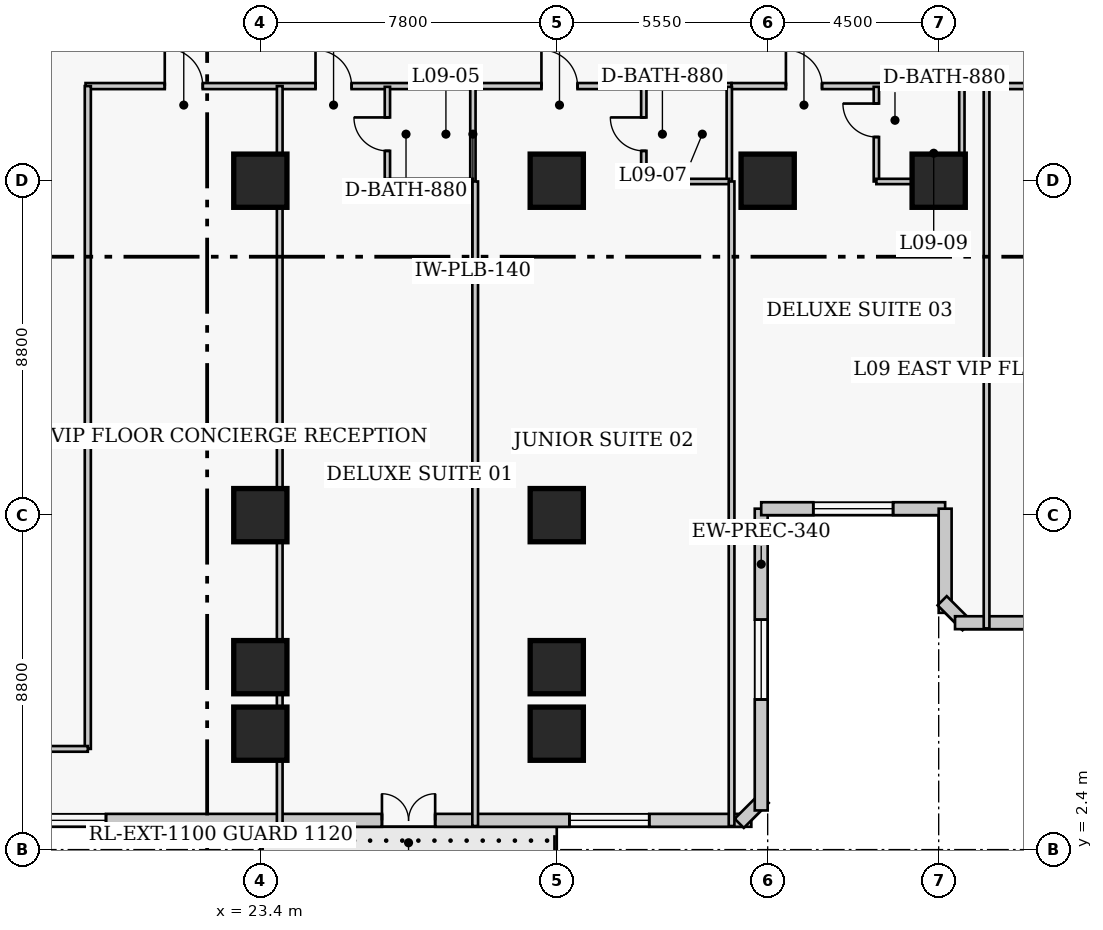
"""IFC4 building model, lengths in metres.
Left out: names, types, materials, properties, quantities, classifications, styles, units other than length and angle.
Written with IfcOpenShell. Run it as: python <this file> out.ifc"""

import sys

from ifc_helpers import new_model, si_unit, direction, frame, frame_2d, origin, origin_2d, place, context, subcontext, project, spatial, rectangle, extrude, element, fill, save


model = new_model("IFC4")
c1 = context("Model", 3, precision=1e-05, world=origin(), true_north=direction((0.0, 1.0)))
c2 = subcontext(c1, "Body", "Model", "MODEL_VIEW")
j1 = project(units=[si_unit("LENGTHUNIT", "METRE"), si_unit("PLANEANGLEUNIT", "RADIAN")], contexts=[c1])
p1 = place(None, origin())
s1 = spatial("IfcSite", under=j1, at=p1, CompositionType="ELEMENT")
p2 = place(p1, origin())
s2 = spatial("IfcBuilding", under=s1, at=p2, CompositionType="ELEMENT")
p3 = place(p2, frame((0.0, 0.0, 41.2)))
s3 = spatial("IfcBuildingStorey", under=s2, at=p3, CompositionType="ELEMENT", Elevation=41.2)
for number, where, z_axis, x_axis in (
    (1, (23.4, 11.2, 0.0), (0.0, 0.0, 1.0), (1.0, 0.0, 0.0)),
    (2, (23.4, 20.0, 0.0), (0.0, 0.0, 1.0), (1.0, 0.0, 0.0)),
    (3, (31.2, 11.2, 0.0), (0.0, 0.0, 1.0), (1.0, 0.0, 0.0)),
    (4, (31.2, 20.0, 0.0), (0.0, 0.0, 1.0), (1.0, 0.0, 0.0)),
    (5, (36.75, 20.0, 0.0), (0.0, 0.0, 1.0), (1.0, 0.0, 0.0)),
    (6, (41.25, 20.0, 0.0), (0.0, 0.0, 1.0), (1.0, 0.0, 0.0)),
    (7, (23.4, 7.2, 0.0), (0.0, 0.0, 1.0), (1.0, 0.0, 0.0)),
    (8, (31.2, 7.2, 0.0), (0.0, 0.0, 1.0), (1.0, 0.0, 0.0)),
    (9, (23.4, 5.45, 0.0), (0.0, 0.0, 1.0), (1.0, 0.0, 0.0)),
    (10, (31.2, 5.45, 0.0), (0.0, 0.0, 1.0), (1.0, 0.0, 0.0)),
):
    element("IfcColumn", number, at=place(p3, frame(where, z_axis=z_axis, x_axis=x_axis)), inside=s3, PredefinedType="COLUMN", context=c2, shape_type="SweptSolid", body=[
        extrude(rectangle(XDim=1.4, YDim=1.4, at=origin_2d()), origin(), (0.0, 0.0, 1.0), 3.8),
    ])
p4 = place(p3, frame((6.43, 3.17, 0.0), z_axis=(0.0, 0.0, 1.0), x_axis=(1.0, 0.0, 0.0)))
e11 = element("IfcWall", 11, at=p4, inside=s3, PredefinedType="SOLIDWALL", context=c2, shape_type="SweptSolid", body=[
    extrude(rectangle(XDim=29.89, YDim=0.34, at=frame_2d((14.945, 0.0))), origin(), (0.0, 0.0, 1.0), 3.54),
])
p5 = place(p4, frame((20.17, 0.0, 0.0)))
e12 = element("IfcOpeningElement", 12, at=p5, cuts=e11, PredefinedType="OPENING", context=c2, shape_type="SweptSolid", body=[
    extrude(rectangle(XDim=1.4, YDim=2.15, at=frame_2d((0.7, 1.075))), frame((0.0, 0.18, 0.0), z_axis=(0.0, -1.0, 0.0), x_axis=(1.0, 0.0, 0.0)), (0.0, 0.0, 1.0), 0.36),
])
p6 = place(p4, frame((2.686, 0.0, 0.85)))
e13 = element("IfcOpeningElement", 13, at=p6, cuts=e11, PredefinedType="OPENING", context=c2, shape_type="SweptSolid", body=[
    extrude(rectangle(XDim=2.1, YDim=1.85, at=frame_2d((1.05, 0.925))), frame((0.0, 0.18, 0.0), z_axis=(0.0, -1.0, 0.0), x_axis=(1.0, 0.0, 0.0)), (0.0, 0.0, 1.0), 0.36),
])
p7 = place(p4, frame((10.809, 0.0, 0.85)))
e14 = element("IfcOpeningElement", 14, at=p7, cuts=e11, PredefinedType="OPENING", context=c2, shape_type="SweptSolid", body=[
    extrude(rectangle(XDim=2.1, YDim=1.85, at=frame_2d((1.05, 0.925))), frame((0.0, 0.18, 0.0), z_axis=(0.0, -1.0, 0.0), x_axis=(1.0, 0.0, 0.0)), (0.0, 0.0, 1.0), 0.36),
])
p8 = place(p4, frame((25.104, 0.0, 0.85)))
e15 = element("IfcOpeningElement", 15, at=p8, cuts=e11, PredefinedType="OPENING", context=c2, shape_type="SweptSolid", body=[
    extrude(rectangle(XDim=2.1, YDim=1.85, at=frame_2d((1.05, 0.925))), frame((0.0, 0.18, 0.0), z_axis=(0.0, -1.0, 0.0), x_axis=(1.0, 0.0, 0.0)), (0.0, 0.0, 1.0), 0.36),
])
p9 = place(p3, frame((36.001, 3.092, 0.0), z_axis=(0.0, 0.0, 1.0), x_axis=(0.707106781187, 0.707106781187, 0.0)))
e16 = element("IfcWall", 16, at=p9, inside=s3, PredefinedType="SOLIDWALL", context=c2, shape_type="SweptSolid", body=[
    extrude(rectangle(XDim=0.929, YDim=0.34, at=frame_2d((0.464, 0.0))), origin(), (0.0, 0.0, 1.0), 3.54),
])
p10 = place(p3, frame((36.58, 3.43, 0.0), z_axis=(0.0, 0.0, 1.0), x_axis=(0.0, 1.0, 0.0)))
e17 = element("IfcWall", 17, at=p10, inside=s3, PredefinedType="SOLIDWALL", context=c2, shape_type="SweptSolid", body=[
    extrude(rectangle(XDim=7.94, YDim=0.34, at=frame_2d((3.97, 0.0))), origin(), (0.0, 0.0, 1.0), 3.54),
])
p11 = place(p10, frame((2.92, 0.0, 0.85)))
e18 = element("IfcOpeningElement", 18, at=p11, cuts=e17, PredefinedType="OPENING", context=c2, shape_type="SweptSolid", body=[
    extrude(rectangle(XDim=2.1, YDim=1.85, at=frame_2d((1.05, 0.925))), frame((0.0, 0.18, 0.0), z_axis=(0.0, -1.0, 0.0), x_axis=(1.0, 0.0, 0.0)), (0.0, 0.0, 1.0), 0.36),
])
p12 = place(p3, frame((36.58, 11.37, 0.0), z_axis=(0.0, 0.0, 1.0), x_axis=(1.0, 0.0, 0.0)))
e19 = element("IfcWall", 19, at=p12, inside=s3, PredefinedType="SOLIDWALL", context=c2, shape_type="SweptSolid", body=[
    extrude(rectangle(XDim=4.84, YDim=0.34, at=frame_2d((2.42, 0.0))), origin(), (0.0, 0.0, 1.0), 3.54),
])
p13 = place(p12, frame((1.37, 0.0, 0.85)))
e20 = element("IfcOpeningElement", 20, at=p13, cuts=e19, PredefinedType="OPENING", context=c2, shape_type="SweptSolid", body=[
    extrude(rectangle(XDim=2.1, YDim=1.85, at=frame_2d((1.05, 0.925))), frame((0.0, 0.18, 0.0), z_axis=(0.0, -1.0, 0.0), x_axis=(1.0, 0.0, 0.0)), (0.0, 0.0, 1.0), 0.36),
])
p14 = place(p3, frame((41.42, 11.37, 0.0), z_axis=(0.0, 0.0, 1.0), x_axis=(0.0, -1.0, 0.0)))
e21 = element("IfcWall", 21, at=p14, inside=s3, PredefinedType="SOLIDWALL", context=c2, shape_type="SweptSolid", body=[
    extrude(rectangle(XDim=2.74, YDim=0.34, at=frame_2d((1.37, 0.0))), origin(), (0.0, 0.0, 1.0), 3.54),
])
p15 = place(p3, frame((41.342, 8.948, 0.0), z_axis=(0.0, 0.0, 1.0), x_axis=(0.707238225886, -0.706975312048, 0.0)))
e22 = element("IfcWall", 22, at=p15, inside=s3, PredefinedType="SOLIDWALL", context=c2, shape_type="SweptSolid", body=[
    extrude(rectangle(XDim=0.929, YDim=0.34, at=frame_2d((0.464, 0.0))), origin(), (0.0, 0.0, 1.0), 3.54),
])
p16 = place(p3, frame((41.68, 8.37, 0.0), z_axis=(0.0, 0.0, 1.0), x_axis=(1.0, 0.0, 0.0)))
e23 = element("IfcWall", 23, at=p16, inside=s3, PredefinedType="SOLIDWALL", context=c2, shape_type="SweptSolid", body=[
    extrude(rectangle(XDim=29.89, YDim=0.34, at=frame_2d((14.945, 0.0))), origin(), (0.0, 0.0, 1.0), 3.54),
])
p17 = place(p16, frame((2.036, 0.0, 0.85)))
e24 = element("IfcOpeningElement", 24, at=p17, cuts=e23, PredefinedType="OPENING", context=c2, shape_type="SweptSolid", body=[
    extrude(rectangle(XDim=2.1, YDim=1.85, at=frame_2d((1.05, 0.925))), frame((0.0, 0.18, 0.0), z_axis=(0.0, -1.0, 0.0), x_axis=(1.0, 0.0, 0.0)), (0.0, 0.0, 1.0), 0.36),
])
p18 = place(p16, frame((9.009, 0.0, 0.85)))
e25 = element("IfcOpeningElement", 25, at=p18, cuts=e23, PredefinedType="OPENING", context=c2, shape_type="SweptSolid", body=[
    extrude(rectangle(XDim=2.1, YDim=1.85, at=frame_2d((1.05, 0.925))), frame((0.0, 0.18, 0.0), z_axis=(0.0, -1.0, 0.0), x_axis=(1.0, 0.0, 0.0)), (0.0, 0.0, 1.0), 0.36),
])
p19 = place(p16, frame((26.254, 0.0, 0.85)))
e26 = element("IfcOpeningElement", 26, at=p19, cuts=e23, PredefinedType="OPENING", context=c2, shape_type="SweptSolid", body=[
    extrude(rectangle(XDim=2.1, YDim=1.85, at=frame_2d((1.05, 0.925))), frame((0.0, 0.18, 0.0), z_axis=(0.0, -1.0, 0.0), x_axis=(1.0, 0.0, 0.0)), (0.0, 0.0, 1.0), 0.36),
])
p20 = place(p16, frame((13.845, 0.0, 0.85)))
e27 = element("IfcOpeningElement", 27, at=p20, cuts=e23, PredefinedType="OPENING", context=c2, shape_type="SweptSolid", body=[
    extrude(rectangle(XDim=1.3, YDim=1.7, at=frame_2d((0.65, 0.85))), frame((0.0, 0.18, 0.0), z_axis=(0.0, -1.0, 0.0), x_axis=(1.0, 0.0, 0.0)), (0.0, 0.0, 1.0), 0.36),
])
p21 = place(p3, frame((18.8, 22.49, 0.0), z_axis=(0.0, 0.0, 1.0), x_axis=(1.0, 0.0, 0.0)))
e28 = element("IfcWall", 28, at=p21, inside=s3, PredefinedType="PARTITIONING", context=c2, shape_type="SweptSolid", body=[
    extrude(rectangle(XDim=17.0, YDim=0.16, at=frame_2d((8.5, 0.0))), origin(), (0.0, 0.0, 1.0), 3.54),
])
p22 = place(p21, frame((2.085, 0.0, 0.0)))
e29 = element("IfcOpeningElement", 29, at=p22, cuts=e28, PredefinedType="OPENING", context=c2, shape_type="SweptSolid", body=[
    extrude(rectangle(XDim=1.0, YDim=2.15, at=frame_2d((0.5, 1.075))), frame((0.0, 0.09, 0.0), z_axis=(0.0, -1.0, 0.0), x_axis=(1.0, 0.0, 0.0)), (0.0, 0.0, 1.0), 0.18),
])
p23 = place(p21, frame((6.052, 0.0, 0.0)))
e30 = element("IfcOpeningElement", 30, at=p23, cuts=e28, PredefinedType="OPENING", context=c2, shape_type="SweptSolid", body=[
    extrude(rectangle(XDim=0.95, YDim=2.1, at=frame_2d((0.475, 1.05))), frame((0.0, 0.09, 0.0), z_axis=(0.0, -1.0, 0.0), x_axis=(1.0, 0.0, 0.0)), (0.0, 0.0, 1.0), 0.18),
])
p24 = place(p21, frame((11.997, 0.0, 0.0)))
e31 = element("IfcOpeningElement", 31, at=p24, cuts=e28, PredefinedType="OPENING", context=c2, shape_type="SweptSolid", body=[
    extrude(rectangle(XDim=0.95, YDim=2.1, at=frame_2d((0.475, 1.05))), frame((0.0, 0.09, 0.0), z_axis=(0.0, -1.0, 0.0), x_axis=(1.0, 0.0, 0.0)), (0.0, 0.0, 1.0), 0.18),
])
p25 = place(p3, frame((35.8, 22.49, 0.0), z_axis=(0.0, 0.0, 1.0), x_axis=(1.0, 0.0, 0.0)))
e32 = element("IfcWall", 32, at=p25, inside=s3, PredefinedType="PARTITIONING", context=c2, shape_type="SweptSolid", body=[
    extrude(rectangle(XDim=22.5, YDim=0.16, at=frame_2d((11.25, 0.0))), origin(), (0.0, 0.0, 1.0), 3.54),
])
p26 = place(p25, frame((1.43, 0.0, 0.0)))
e33 = element("IfcOpeningElement", 33, at=p26, cuts=e32, PredefinedType="OPENING", context=c2, shape_type="SweptSolid", body=[
    extrude(rectangle(XDim=0.95, YDim=2.1, at=frame_2d((0.475, 1.05))), frame((0.0, 0.09, 0.0), z_axis=(0.0, -1.0, 0.0), x_axis=(1.0, 0.0, 0.0)), (0.0, 0.0, 1.0), 0.18),
])
p27 = place(p25, frame((9.015, 0.0, 0.0)))
e34 = element("IfcOpeningElement", 34, at=p27, cuts=e32, PredefinedType="OPENING", context=c2, shape_type="SweptSolid", body=[
    extrude(rectangle(XDim=1.0, YDim=2.15, at=frame_2d((0.5, 1.075))), frame((0.0, 0.09, 0.0), z_axis=(0.0, -1.0, 0.0), x_axis=(1.0, 0.0, 0.0)), (0.0, 0.0, 1.0), 0.18),
])
p28 = place(p25, frame((13.225, 0.0, 0.0)))
e35 = element("IfcOpeningElement", 35, at=p28, cuts=e32, PredefinedType="OPENING", context=c2, shape_type="SweptSolid", body=[
    extrude(rectangle(XDim=0.95, YDim=2.1, at=frame_2d((0.475, 1.05))), frame((0.0, 0.09, 0.0), z_axis=(0.0, -1.0, 0.0), x_axis=(1.0, 0.0, 0.0)), (0.0, 0.0, 1.0), 0.18),
])
p29 = place(p25, frame((18.285, 0.0, 0.0)))
e36 = element("IfcOpeningElement", 36, at=p29, cuts=e32, PredefinedType="OPENING", context=c2, shape_type="SweptSolid", body=[
    extrude(rectangle(XDim=0.95, YDim=2.1, at=frame_2d((0.475, 1.05))), frame((0.0, 0.09, 0.0), z_axis=(0.0, -1.0, 0.0), x_axis=(1.0, 0.0, 0.0)), (0.0, 0.0, 1.0), 0.18),
])
p30 = place(p3, frame((18.86, 5.05, 0.0), z_axis=(0.0, 0.0, 1.0), x_axis=(0.0, 1.0, 0.0)))
e37 = element("IfcWall", 37, at=p30, inside=s3, PredefinedType="PARTITIONING", context=c2, shape_type="SweptSolid", body=[
    extrude(rectangle(XDim=17.44, YDim=0.16, at=frame_2d((8.72, 0.0))), origin(), (0.0, 0.0, 1.0), 3.54),
])
p31 = place(p3, frame((16.64, 5.05, 0.0), z_axis=(0.0, 0.0, 1.0), x_axis=(1.0, 0.0, 0.0)))
e38 = element("IfcWall", 38, at=p31, inside=s3, PredefinedType="PARTITIONING", context=c2, shape_type="SweptSolid", body=[
    extrude(rectangle(XDim=2.22, YDim=0.15, at=frame_2d((1.11, 0.0))), origin(), (0.0, 0.0, 1.0), 3.54),
])
p32 = place(p3, frame((23.91, 3.02, 0.0), z_axis=(0.0, 0.0, 1.0), x_axis=(0.0, 1.0, 0.0)))
e39 = element("IfcWall", 39, at=p32, inside=s3, PredefinedType="PARTITIONING", context=c2, shape_type="SweptSolid", body=[
    extrude(rectangle(XDim=19.47, YDim=0.15, at=frame_2d((9.735, 0.0))), origin(), (0.0, 0.0, 1.0), 3.54),
])
p33 = place(p3, frame((26.743, 19.98, 0.0), z_axis=(0.0, 0.0, 1.0), x_axis=(0.0, 1.0, 0.0)))
e40 = element("IfcWall", 40, at=p33, inside=s3, PredefinedType="PLUMBINGWALL", context=c2, shape_type="SweptSolid", body=[
    extrude(rectangle(XDim=2.49, YDim=0.14, at=frame_2d((1.245, 0.0))), origin(), (0.0, 0.0, 1.0), 3.54),
])
p34 = place(p33, frame((0.805, 0.0, 0.0)))
e41 = element("IfcOpeningElement", 41, at=p34, cuts=e40, PredefinedType="OPENING", context=c2, shape_type="SweptSolid", body=[
    extrude(rectangle(XDim=0.88, YDim=2.05, at=frame_2d((0.44, 1.025))), frame((0.0, 0.08, 0.0), z_axis=(0.0, -1.0, 0.0), x_axis=(1.0, 0.0, 0.0)), (0.0, 0.0, 1.0), 0.16),
])
p35 = place(p3, frame((28.993, 19.98, 0.0), z_axis=(0.0, 0.0, 1.0), x_axis=(0.0, 1.0, 0.0)))
e42 = element("IfcWall", 42, at=p35, inside=s3, PredefinedType="PLUMBINGWALL", context=c2, shape_type="SweptSolid", body=[
    extrude(rectangle(XDim=2.49, YDim=0.14, at=frame_2d((1.245, 0.0))), origin(), (0.0, 0.0, 1.0), 3.54),
])
p36 = place(p3, frame((26.743, 19.98, 0.0), z_axis=(0.0, 0.0, 1.0), x_axis=(1.0, 0.0, 0.0)))
e43 = element("IfcWall", 43, at=p36, inside=s3, PredefinedType="PLUMBINGWALL", context=c2, shape_type="SweptSolid", body=[
    extrude(rectangle(XDim=2.25, YDim=0.14, at=frame_2d((1.125, 0.0))), origin(), (0.0, 0.0, 1.0), 2.593),
])
p37 = place(p3, frame((29.053, 3.02, 0.0), z_axis=(0.0, 0.0, 1.0), x_axis=(0.0, 1.0, 0.0)))
e44 = element("IfcWall", 44, at=p37, inside=s3, PredefinedType="PARTITIONING", context=c2, shape_type="SweptSolid", body=[
    extrude(rectangle(XDim=16.96, YDim=0.15, at=frame_2d((8.48, 0.0))), origin(), (0.0, 0.0, 1.0), 3.54),
])
p38 = place(p3, frame((33.49, 19.98, 0.0), z_axis=(0.0, 0.0, 1.0), x_axis=(0.0, 1.0, 0.0)))
e45 = element("IfcWall", 45, at=p38, inside=s3, PredefinedType="PLUMBINGWALL", context=c2, shape_type="SweptSolid", body=[
    extrude(rectangle(XDim=2.49, YDim=0.14, at=frame_2d((1.245, 0.0))), origin(), (0.0, 0.0, 1.0), 3.54),
])
p39 = place(p38, frame((0.805, 0.0, 0.0)))
e46 = element("IfcOpeningElement", 46, at=p39, cuts=e45, PredefinedType="OPENING", context=c2, shape_type="SweptSolid", body=[
    extrude(rectangle(XDim=0.88, YDim=2.05, at=frame_2d((0.44, 1.025))), frame((0.0, 0.08, 0.0), z_axis=(0.0, -1.0, 0.0), x_axis=(1.0, 0.0, 0.0)), (0.0, 0.0, 1.0), 0.16),
])
p40 = place(p3, frame((35.74, 19.98, 0.0), z_axis=(0.0, 0.0, 1.0), x_axis=(0.0, 1.0, 0.0)))
e47 = element("IfcWall", 47, at=p40, inside=s3, PredefinedType="PLUMBINGWALL", context=c2, shape_type="SweptSolid", body=[
    extrude(rectangle(XDim=2.49, YDim=0.14, at=frame_2d((1.245, 0.0))), origin(), (0.0, 0.0, 1.0), 3.54),
])
p41 = place(p3, frame((33.49, 19.98, 0.0), z_axis=(0.0, 0.0, 1.0), x_axis=(1.0, 0.0, 0.0)))
e48 = element("IfcWall", 48, at=p41, inside=s3, PredefinedType="PLUMBINGWALL", context=c2, shape_type="SweptSolid", body=[
    extrude(rectangle(XDim=2.25, YDim=0.14, at=frame_2d((1.125, 0.0))), origin(), (0.0, 0.0, 1.0), 2.593),
])
p42 = place(p3, frame((35.8, 3.02, 0.0), z_axis=(0.0, 0.0, 1.0), x_axis=(0.0, 1.0, 0.0)))
e49 = element("IfcWall", 49, at=p42, inside=s3, PredefinedType="PARTITIONING", context=c2, shape_type="SweptSolid", body=[
    extrude(rectangle(XDim=16.96, YDim=0.15, at=frame_2d((8.48, 0.0))), origin(), (0.0, 0.0, 1.0), 3.54),
])
p43 = place(p3, frame((39.61, 19.98, 0.0), z_axis=(0.0, 0.0, 1.0), x_axis=(0.0, 1.0, 0.0)))
e50 = element("IfcWall", 50, at=p43, inside=s3, PredefinedType="PLUMBINGWALL", context=c2, shape_type="SweptSolid", body=[
    extrude(rectangle(XDim=2.49, YDim=0.14, at=frame_2d((1.245, 0.0))), origin(), (0.0, 0.0, 1.0), 3.54),
])
p44 = place(p43, frame((1.17, 0.0, 0.0)))
e51 = element("IfcOpeningElement", 51, at=p44, cuts=e50, PredefinedType="OPENING", context=c2, shape_type="SweptSolid", body=[
    extrude(rectangle(XDim=0.88, YDim=2.05, at=frame_2d((0.44, 1.025))), frame((0.0, 0.08, 0.0), z_axis=(0.0, -1.0, 0.0), x_axis=(1.0, 0.0, 0.0)), (0.0, 0.0, 1.0), 0.16),
])
p45 = place(p3, frame((41.86, 19.98, 0.0), z_axis=(0.0, 0.0, 1.0), x_axis=(0.0, 1.0, 0.0)))
e52 = element("IfcWall", 52, at=p45, inside=s3, PredefinedType="PLUMBINGWALL", context=c2, shape_type="SweptSolid", body=[
    extrude(rectangle(XDim=2.49, YDim=0.14, at=frame_2d((1.245, 0.0))), origin(), (0.0, 0.0, 1.0), 3.54),
])
p46 = place(p3, frame((39.61, 19.98, 0.0), z_axis=(0.0, 0.0, 1.0), x_axis=(1.0, 0.0, 0.0)))
e53 = element("IfcWall", 53, at=p46, inside=s3, PredefinedType="PLUMBINGWALL", context=c2, shape_type="SweptSolid", body=[
    extrude(rectangle(XDim=2.25, YDim=0.14, at=frame_2d((1.125, 0.0))), origin(), (0.0, 0.0, 1.0), 2.593),
])
p47 = place(p3, frame((42.51, 8.22, 0.0), z_axis=(0.0, 0.0, 1.0), x_axis=(0.0, 1.0, 0.0)))
e54 = element("IfcWall", 54, at=p47, inside=s3, PredefinedType="PARTITIONING", context=c2, shape_type="SweptSolid", body=[
    extrude(rectangle(XDim=14.27, YDim=0.15, at=frame_2d((7.135, 0.0))), origin(), (0.0, 0.0, 1.0), 3.54),
])
p48 = place(p5, origin())
e55 = element("IfcDoor", 55, at=p48, inside=s3, OperationType="DOUBLE_DOOR_SINGLE_SWING", PredefinedType="DOOR", context=c2, shape_type="SweptSolid", body=[
    extrude(rectangle(XDim=1.4, YDim=2.15, at=frame_2d((0.7, 1.075))), frame((0.0, 0.025, 0.0), z_axis=(0.0, -1.0, 0.0), x_axis=(1.0, 0.0, 0.0)), (0.0, 0.0, 1.0), 0.05),
])
fill(e12, e55)
p49 = place(p7, origin())
e56 = element("IfcWindow", 56, at=p49, inside=s3, PartitioningType="SINGLE_PANEL", PredefinedType="WINDOW", context=c2, shape_type="SweptSolid", body=[
    extrude(rectangle(XDim=2.1, YDim=1.85, at=frame_2d((1.05, 0.925))), frame((0.0, 0.03, 0.0), z_axis=(0.0, -1.0, 0.0), x_axis=(1.0, 0.0, 0.0)), (0.0, 0.0, 1.0), 0.06),
])
fill(e14, e56)
p50 = place(p8, origin())
e57 = element("IfcWindow", 57, at=p50, inside=s3, PartitioningType="SINGLE_PANEL", PredefinedType="WINDOW", context=c2, shape_type="SweptSolid", body=[
    extrude(rectangle(XDim=2.1, YDim=1.85, at=frame_2d((1.05, 0.925))), frame((0.0, 0.03, 0.0), z_axis=(0.0, -1.0, 0.0), x_axis=(1.0, 0.0, 0.0)), (0.0, 0.0, 1.0), 0.06),
])
fill(e15, e57)
p51 = place(p11, origin())
e58 = element("IfcWindow", 58, at=p51, inside=s3, PartitioningType="SINGLE_PANEL", PredefinedType="WINDOW", context=c2, shape_type="SweptSolid", body=[
    extrude(rectangle(XDim=2.1, YDim=1.85, at=frame_2d((1.05, 0.925))), frame((0.0, 0.03, 0.0), z_axis=(0.0, -1.0, 0.0), x_axis=(1.0, 0.0, 0.0)), (0.0, 0.0, 1.0), 0.06),
])
fill(e18, e58)
p52 = place(p13, origin())
e59 = element("IfcWindow", 59, at=p52, inside=s3, PartitioningType="SINGLE_PANEL", PredefinedType="WINDOW", context=c2, shape_type="SweptSolid", body=[
    extrude(rectangle(XDim=2.1, YDim=1.85, at=frame_2d((1.05, 0.925))), frame((0.0, 0.03, 0.0), z_axis=(0.0, -1.0, 0.0), x_axis=(1.0, 0.0, 0.0)), (0.0, 0.0, 1.0), 0.06),
])
fill(e20, e59)
p53 = place(p22, origin())
e60 = element("IfcDoor", 60, at=p53, inside=s3, OperationType="SINGLE_SWING_LEFT", PredefinedType="DOOR", context=c2, shape_type="SweptSolid", body=[
    extrude(rectangle(XDim=1.0, YDim=2.15, at=frame_2d((0.5, 1.075))), frame((0.0, 0.025, 0.0), z_axis=(0.0, -1.0, 0.0), x_axis=(1.0, 0.0, 0.0)), (0.0, 0.0, 1.0), 0.05),
])
fill(e29, e60)
p54 = place(p34, origin())
e61 = element("IfcDoor", 61, at=p54, inside=s3, OperationType="SINGLE_SWING_RIGHT", PredefinedType="DOOR", context=c2, shape_type="SweptSolid", body=[
    extrude(rectangle(XDim=0.88, YDim=2.05, at=frame_2d((0.44, 1.025))), frame((0.0, 0.025, 0.0), z_axis=(0.0, -1.0, 0.0), x_axis=(1.0, 0.0, 0.0)), (0.0, 0.0, 1.0), 0.05),
])
fill(e41, e61)
p55 = place(p23, origin())
e62 = element("IfcDoor", 62, at=p55, inside=s3, OperationType="SINGLE_SWING_LEFT", PredefinedType="DOOR", context=c2, shape_type="SweptSolid", body=[
    extrude(rectangle(XDim=0.95, YDim=2.1, at=frame_2d((0.475, 1.05))), frame((0.0, 0.025, 0.0), z_axis=(0.0, -1.0, 0.0), x_axis=(1.0, 0.0, 0.0)), (0.0, 0.0, 1.0), 0.05),
])
fill(e30, e62)
p56 = place(p39, origin())
e63 = element("IfcDoor", 63, at=p56, inside=s3, OperationType="SINGLE_SWING_RIGHT", PredefinedType="DOOR", context=c2, shape_type="SweptSolid", body=[
    extrude(rectangle(XDim=0.88, YDim=2.05, at=frame_2d((0.44, 1.025))), frame((0.0, 0.025, 0.0), z_axis=(0.0, -1.0, 0.0), x_axis=(1.0, 0.0, 0.0)), (0.0, 0.0, 1.0), 0.05),
])
fill(e46, e63)
p57 = place(p24, origin())
e64 = element("IfcDoor", 64, at=p57, inside=s3, OperationType="SINGLE_SWING_LEFT", PredefinedType="DOOR", context=c2, shape_type="SweptSolid", body=[
    extrude(rectangle(XDim=0.95, YDim=2.1, at=frame_2d((0.475, 1.05))), frame((0.0, 0.025, 0.0), z_axis=(0.0, -1.0, 0.0), x_axis=(1.0, 0.0, 0.0)), (0.0, 0.0, 1.0), 0.05),
])
fill(e31, e64)
p58 = place(p44, origin())
e65 = element("IfcDoor", 65, at=p58, inside=s3, OperationType="SINGLE_SWING_RIGHT", PredefinedType="DOOR", context=c2, shape_type="SweptSolid", body=[
    extrude(rectangle(XDim=0.88, YDim=2.05, at=frame_2d((0.44, 1.025))), frame((0.0, 0.025, 0.0), z_axis=(0.0, -1.0, 0.0), x_axis=(1.0, 0.0, 0.0)), (0.0, 0.0, 1.0), 0.05),
])
fill(e51, e65)
p59 = place(p26, origin())
e66 = element("IfcDoor", 66, at=p59, inside=s3, OperationType="SINGLE_SWING_LEFT", PredefinedType="DOOR", context=c2, shape_type="SweptSolid", body=[
    extrude(rectangle(XDim=0.95, YDim=2.1, at=frame_2d((0.475, 1.05))), frame((0.0, 0.025, 0.0), z_axis=(0.0, -1.0, 0.0), x_axis=(1.0, 0.0, 0.0)), (0.0, 0.0, 1.0), 0.05),
])
fill(e33, e66)
save(model, sys.argv[1])
